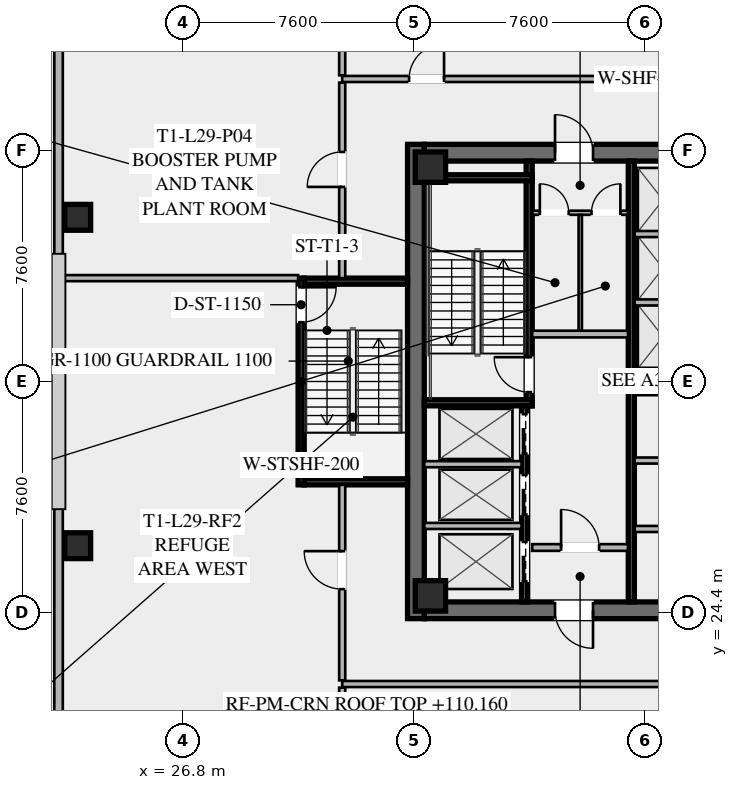
"""IFC4 building model, lengths in metres.
Left out: names, types, materials, properties, quantities, classifications, styles, units other than length and angle.
Written with IfcOpenShell. Run it as: python <this file> out.ifc"""

import sys

from ifc_helpers import new_model, si_unit, direction, frame, frame_2d, origin, origin_2d, place, context, subcontext, project, spatial, rectangle, hollow_rectangle, extrude, element, fill, save


model = new_model("IFC4")
c1 = context("Model", 3, precision=1e-05, world=origin(), true_north=direction((0.0, 1.0)))
c2 = subcontext(c1, "Body", "Model", "MODEL_VIEW")
j1 = project(units=[si_unit("LENGTHUNIT", "METRE"), si_unit("PLANEANGLEUNIT", "RADIAN")], contexts=[c1])
p1 = place(None, origin())
s1 = spatial("IfcSite", under=j1, at=p1, CompositionType="ELEMENT")
p2 = place(p1, origin())
s2 = spatial("IfcBuilding", under=s1, at=p2, CompositionType="ELEMENT")
p3 = place(p2, frame((0.0, 0.0, 109.8)))
s3 = spatial("IfcBuildingStorey", under=s2, at=p3, CompositionType="ELEMENT", Elevation=109.8)
p4 = place(p3, frame((34.475, 24.2, 0.0), z_axis=(0.0, 0.0, 1.0), x_axis=(0.0, 1.0, 0.0)))
e1 = element("IfcWall", 1, at=p4, inside=s3, PredefinedType="SHEAR", context=c2, shape_type="SweptSolid", body=[
    extrude(rectangle(XDim=15.6, YDim=0.55, at=frame_2d((7.8, 0.0))), origin(), (0.0, 0.0, 1.0), 4.6),
])
p5 = place(p3, frame((49.25, 24.475, 0.0), z_axis=(0.0, 0.0, 1.0), x_axis=(-1.0, 0.0, 0.0)))
e2 = element("IfcWall", 2, at=p5, inside=s3, PredefinedType="SHEAR", context=c2, shape_type="SweptSolid", body=[
    extrude(rectangle(XDim=14.5, YDim=0.55, at=frame_2d((7.25, 0.0))), origin(), (0.0, 0.0, 1.0), 4.6),
])
p6 = place(p5, frame((8.95, 0.0, 0.0)))
e3 = element("IfcOpeningElement", 3, at=p6, cuts=e2, PredefinedType="OPENING", context=c2, shape_type="SweptSolid", body=[
    extrude(rectangle(XDim=1.25, YDim=2.25, at=frame_2d((0.625, 1.125))), frame((0.0, 0.285, 0.0), z_axis=(0.0, -1.0, 0.0), x_axis=(1.0, 0.0, 0.0)), (0.0, 0.0, 1.0), 0.57),
])
p7 = place(p5, frame((3.9, 0.0, 0.0)))
e4 = element("IfcOpeningElement", 4, at=p7, cuts=e2, PredefinedType="OPENING", context=c2, shape_type="SweptSolid", body=[
    extrude(rectangle(XDim=1.25, YDim=2.25, at=frame_2d((0.625, 1.125))), frame((0.0, 0.285, 0.0), z_axis=(0.0, -1.0, 0.0), x_axis=(1.0, 0.0, 0.0)), (0.0, 0.0, 1.0), 0.57),
])
p8 = place(p3, frame((34.75, 39.525, 0.0), z_axis=(0.0, 0.0, 1.0), x_axis=(1.0, 0.0, 0.0)))
e5 = element("IfcWall", 5, at=p8, inside=s3, PredefinedType="SHEAR", context=c2, shape_type="SweptSolid", body=[
    extrude(rectangle(XDim=14.5, YDim=0.55, at=frame_2d((7.25, 0.0))), origin(), (0.0, 0.0, 1.0), 4.6),
])
p9 = place(p8, frame((4.3, 0.0, 0.0)))
e6 = element("IfcOpeningElement", 6, at=p9, cuts=e5, PredefinedType="OPENING", context=c2, shape_type="SweptSolid", body=[
    extrude(rectangle(XDim=1.25, YDim=2.25, at=frame_2d((0.625, 1.125))), frame((0.0, 0.285, 0.0), z_axis=(0.0, -1.0, 0.0), x_axis=(1.0, 0.0, 0.0)), (0.0, 0.0, 1.0), 0.57),
])
p10 = place(p8, frame((9.35, 0.0, 0.0)))
e7 = element("IfcOpeningElement", 7, at=p10, cuts=e5, PredefinedType="OPENING", context=c2, shape_type="SweptSolid", body=[
    extrude(rectangle(XDim=1.25, YDim=2.25, at=frame_2d((0.625, 1.125))), frame((0.0, 0.285, 0.0), z_axis=(0.0, -1.0, 0.0), x_axis=(1.0, 0.0, 0.0)), (0.0, 0.0, 1.0), 0.57),
])
for number, where, z_axis, x_axis in (
    (8, (34.95, 24.95, 0.0), (0.0, 0.0, 1.0), (1.0, 0.0, 0.0)),
    (9, (34.95, 39.05, 0.0), (0.0, 0.0, 1.0), (1.0, 0.0, 0.0)),
):
    element("IfcColumn", number, at=place(p3, frame(where, z_axis=z_axis, x_axis=x_axis)), inside=s3, PredefinedType="COLUMN", context=c2, shape_type="SweptSolid", body=[
        extrude(hollow_rectangle(XDim=1.0, YDim=1.0, WallThickness=0.04, at=origin_2d()), origin(), (0.0, 0.0, 1.0), 4.42),
    ])
for number, where, z_axis, x_axis in (
    (10, (23.35, 37.4, -0.295), (0.0, 0.0, 1.0), (1.0, 0.0, 0.0)),
    (11, (23.35, 26.6, -0.295), (0.0, 0.0, 1.0), (1.0, 0.0, 0.0)),
):
    element("IfcColumn", number, at=place(p3, frame(where, z_axis=z_axis, x_axis=x_axis)), inside=s3, PredefinedType="COLUMN", context=c2, shape_type="SweptSolid", body=[
        extrude(hollow_rectangle(XDim=0.85, YDim=0.85, WallThickness=0.035, at=origin_2d()), origin(), (0.0, 0.0, 1.0), 4.715),
    ])
p11 = place(p3, frame((22.72, 15.22, 0.0), z_axis=(0.0, 0.0, 1.0), x_axis=(0.0, 1.0, 0.0)))
e12 = element("IfcWall", 12, at=p11, inside=s3, PredefinedType="SOLIDWALL", context=c2, shape_type="SweptSolid", body=[
    extrude(rectangle(XDim=33.56, YDim=0.28, at=frame_2d((16.78, 0.0))), origin(), (0.0, 0.0, 1.0), 4.42),
])
p12 = place(p3, frame((38.2, 31.2, 0.0), z_axis=(0.0, 0.0, 1.0), x_axis=(0.0, 1.0, 0.0)))
e13 = element("IfcWall", 13, at=p12, inside=s3, PredefinedType="SHEAR", context=c2, shape_type="SweptSolid", body=[
    extrude(rectangle(XDim=8.05, YDim=0.2, at=frame_2d((4.025, 0.0))), origin(), (0.0, 0.0, 1.0), 4.42),
])
p13 = place(p12, frame((0.45, 0.0, 0.0)))
e14 = element("IfcOpeningElement", 14, at=p13, cuts=e13, PredefinedType="OPENING", context=c2, shape_type="SweptSolid", body=[
    extrude(rectangle(XDim=1.15, YDim=2.2, at=frame_2d((0.575, 1.1))), frame((0.0, 0.11, 0.0), z_axis=(0.0, -1.0, 0.0), x_axis=(1.0, 0.0, 0.0)), (0.0, 0.0, 1.0), 0.22),
])
for number, where, z_axis, x_axis in (
    (15, (34.75, 31.3, 0.0), (0.0, 0.0, 1.0), (1.0, 0.0, 0.0)),
    (16, (34.75, 38.7, 0.0), (0.0, 0.0, 1.0), (1.0, 0.0, 0.0)),
):
    element("IfcWall", number, at=place(p3, frame(where, z_axis=z_axis, x_axis=x_axis)), inside=s3, PredefinedType="SHEAR", context=c2, shape_type="SweptSolid", body=[
        extrude(rectangle(XDim=3.55, YDim=0.2, at=frame_2d((1.775, 0.0))), origin(), (0.0, 0.0, 1.0), 4.42),
    ])
p14 = place(p3, frame((41.56, 24.75, 0.0), z_axis=(0.0, 0.0, 1.0), x_axis=(0.0, 1.0, 0.0)))
e17 = element("IfcWall", 17, at=p14, inside=s3, PredefinedType="SHEAR", context=c2, shape_type="SweptSolid", body=[
    extrude(rectangle(XDim=14.5, YDim=0.2, at=frame_2d((7.25, 0.0))), origin(), (0.0, 0.0, 1.0), 4.42),
])
p15 = place(p3, frame((38.3, 33.56, 0.0), z_axis=(0.0, 0.0, 1.0), x_axis=(1.0, 0.0, 0.0)))
e18 = element("IfcWall", 18, at=p15, inside=s3, PredefinedType="SOLIDWALL", context=c2, shape_type="SweptSolid", body=[
    extrude(rectangle(XDim=3.15, YDim=0.22, at=frame_2d((1.575, 0.0))), origin(), (0.0, 0.0, 1.0), 3.531),
])
p16 = place(p3, frame((38.3, 26.54, 0.0), z_axis=(0.0, 0.0, 1.0), x_axis=(1.0, 0.0, 0.0)))
e19 = element("IfcWall", 19, at=p16, inside=s3, PredefinedType="SOLIDWALL", context=c2, shape_type="SweptSolid", body=[
    extrude(rectangle(XDim=3.15, YDim=0.22, at=frame_2d((1.575, 0.0))), origin(), (0.0, 0.0, 1.0), 3.531),
])
p17 = place(p16, frame((0.95, 0.0, 0.0)))
e20 = element("IfcOpeningElement", 20, at=p17, cuts=e19, PredefinedType="OPENING", context=c2, shape_type="SweptSolid", body=[
    extrude(rectangle(XDim=1.25, YDim=2.25, at=frame_2d((0.625, 1.125))), frame((0.0, 0.12, 0.0), z_axis=(0.0, -1.0, 0.0), x_axis=(1.0, 0.0, 0.0)), (0.0, 0.0, 1.0), 0.24),
])
p18 = place(p3, frame((38.05, 24.75, 0.0), z_axis=(0.0, 0.0, 1.0), x_axis=(0.0, 1.0, 0.0)))
e21 = element("IfcWall", 21, at=p18, inside=s3, PredefinedType="SHEAR", context=c2, shape_type="SweptSolid", body=[
    extrude(rectangle(XDim=6.45, YDim=0.2, at=frame_2d((3.225, 0.0))), origin(), (0.0, 0.0, 1.0), 4.42),
])
p19 = place(p18, frame((4.875, 0.0, 0.0)))
e22 = element("IfcOpeningElement", 22, at=p19, cuts=e21, PredefinedType="OPENING", context=c2, shape_type="SweptSolid", body=[
    extrude(rectangle(XDim=1.3, YDim=2.25, at=frame_2d((0.65, 1.125))), frame((0.0, 0.11, 0.0), z_axis=(0.0, -1.0, 0.0), x_axis=(1.0, 0.0, 0.0)), (0.0, 0.0, 1.0), 0.22),
])
p20 = place(p18, frame((2.875, 0.0, 0.0)))
e23 = element("IfcOpeningElement", 23, at=p20, cuts=e21, PredefinedType="OPENING", context=c2, shape_type="SweptSolid", body=[
    extrude(rectangle(XDim=1.3, YDim=2.25, at=frame_2d((0.65, 1.125))), frame((0.0, 0.11, 0.0), z_axis=(0.0, -1.0, 0.0), x_axis=(1.0, 0.0, 0.0)), (0.0, 0.0, 1.0), 0.22),
])
p21 = place(p18, frame((0.675, 0.0, 0.0)))
e24 = element("IfcOpeningElement", 24, at=p21, cuts=e21, PredefinedType="OPENING", context=c2, shape_type="SweptSolid", body=[
    extrude(rectangle(XDim=1.3, YDim=2.25, at=frame_2d((0.65, 1.125))), frame((0.0, 0.11, 0.0), z_axis=(0.0, -1.0, 0.0), x_axis=(1.0, 0.0, 0.0)), (0.0, 0.0, 1.0), 0.22),
])
for number, where, z_axis, x_axis in (
    (25, (34.75, 27.25, 0.0), (0.0, 0.0, 1.0), (1.0, 0.0, 0.0)),
    (26, (34.75, 29.28, 0.0), (0.0, 0.0, 1.0), (1.0, 0.0, 0.0)),
):
    element("IfcWall", number, at=place(p3, frame(where, z_axis=z_axis, x_axis=x_axis)), inside=s3, PredefinedType="SOLIDWALL", context=c2, shape_type="SweptSolid", body=[
        extrude(rectangle(XDim=3.2, YDim=0.2, at=frame_2d((1.6, 0.0))), origin(), (0.0, 0.0, 1.0), 4.42),
    ])
p22 = place(p3, frame((38.3, 37.55, 0.0), z_axis=(0.0, 0.0, 1.0), x_axis=(1.0, 0.0, 0.0)))
e27 = element("IfcWall", 27, at=p22, inside=s3, PredefinedType="PARTITIONING", context=c2, shape_type="SweptSolid", body=[
    extrude(rectangle(XDim=3.15, YDim=0.135, at=frame_2d((1.575, 0.0))), origin(), (0.0, 0.0, 1.0), 3.531),
])
p23 = place(p22, frame((0.25, 0.0, 0.0)))
e28 = element("IfcOpeningElement", 28, at=p23, cuts=e27, PredefinedType="OPENING", context=c2, shape_type="SweptSolid", body=[
    extrude(rectangle(XDim=0.95, YDim=2.05, at=frame_2d((0.475, 1.025))), frame((0.0, 0.077, 0.0), z_axis=(0.0, -1.0, 0.0), x_axis=(1.0, 0.0, 0.0)), (0.0, 0.0, 1.0), 0.155),
])
p24 = place(p22, frame((1.95, 0.0, 0.0)))
e29 = element("IfcOpeningElement", 29, at=p24, cuts=e27, PredefinedType="OPENING", context=c2, shape_type="SweptSolid", body=[
    extrude(rectangle(XDim=0.95, YDim=2.05, at=frame_2d((0.475, 1.025))), frame((0.0, 0.077, 0.0), z_axis=(0.0, -1.0, 0.0), x_axis=(1.0, 0.0, 0.0)), (0.0, 0.0, 1.0), 0.155),
])
p25 = place(p3, frame((39.88, 33.68, 0.0), z_axis=(0.0, 0.0, 1.0), x_axis=(0.0, 1.0, 0.0)))
e30 = element("IfcWall", 30, at=p25, inside=s3, PredefinedType="PARTITIONING", context=c2, shape_type="SweptSolid", body=[
    extrude(rectangle(XDim=3.8, YDim=0.11, at=frame_2d((1.9, 0.0))), origin(), (0.0, 0.0, 1.0), 3.531),
])
for number, where, z_axis, x_axis in (
    (31, (41.67, 27.15, 0.0), (0.0, 0.0, 1.0), (1.0, 0.0, 0.0)),
    (32, (41.67, 29.4, 0.0), (0.0, 0.0, 1.0), (1.0, 0.0, 0.0)),
    (33, (41.67, 31.65, 0.0), (0.0, 0.0, 1.0), (1.0, 0.0, 0.0)),
    (34, (41.67, 32.35, 0.0), (0.0, 0.0, 1.0), (1.0, 0.0, 0.0)),
    (35, (41.67, 34.6, 0.0), (0.0, 0.0, 1.0), (1.0, 0.0, 0.0)),
    (36, (41.67, 36.85, 0.0), (0.0, 0.0, 1.0), (1.0, 0.0, 0.0)),
):
    element("IfcWall", number, at=place(p3, frame(where, z_axis=z_axis, x_axis=x_axis)), inside=s3, PredefinedType="SOLIDWALL", context=c2, shape_type="SweptSolid", body=[
        extrude(rectangle(XDim=1.88, YDim=0.2, at=frame_2d((0.94, 0.0))), origin(), (0.0, 0.0, 1.0), 4.42),
    ])
p26 = place(p3, frame((30.7, 35.4, 0.0), z_axis=(0.0, 0.0, 1.0), x_axis=(0.0, -1.0, 0.0)))
e37 = element("IfcWall", 37, at=p26, inside=s3, PredefinedType="SHEAR", context=c2, shape_type="SweptSolid", body=[
    extrude(rectangle(XDim=6.8, YDim=0.2, at=frame_2d((3.4, 0.0))), origin(), (0.0, 0.0, 1.0), 4.42),
])
p27 = place(p26, frame((0.3, 0.0, 0.0)))
e38 = element("IfcOpeningElement", 38, at=p27, cuts=e37, PredefinedType="OPENING", context=c2, shape_type="SweptSolid", body=[
    extrude(rectangle(XDim=1.15, YDim=2.2, at=frame_2d((0.575, 1.1))), frame((0.0, 0.11, 0.0), z_axis=(0.0, -1.0, 0.0), x_axis=(1.0, 0.0, 0.0)), (0.0, 0.0, 1.0), 0.22),
])
for number, where, z_axis, x_axis in (
    (39, (34.2, 35.3, 0.0), (0.0, 0.0, 1.0), (-1.0, 0.0, 0.0)),
    (40, (30.8, 28.7, 0.0), (0.0, 0.0, 1.0), (1.0, 0.0, 0.0)),
):
    element("IfcWall", number, at=place(p3, frame(where, z_axis=z_axis, x_axis=x_axis)), inside=s3, PredefinedType="SHEAR", context=c2, shape_type="SweptSolid", body=[
        extrude(rectangle(XDim=3.4, YDim=0.2, at=frame_2d((1.7, 0.0))), origin(), (0.0, 0.0, 1.0), 4.42),
    ])
p28 = place(p3, frame((32.05, 41.95, 0.0), z_axis=(0.0, 0.0, 1.0), x_axis=(1.0, 0.0, 0.0)))
e41 = element("IfcWall", 41, at=p28, inside=s3, PredefinedType="SOLIDWALL", context=c2, shape_type="SweptSolid", body=[
    extrude(rectangle(XDim=19.9, YDim=0.2, at=frame_2d((9.95, 0.0))), origin(), (0.0, 0.0, 1.0), 3.531),
])
p29 = place(p28, frame((2.2, 0.0, 0.0)))
e42 = element("IfcOpeningElement", 42, at=p29, cuts=e41, PredefinedType="OPENING", context=c2, shape_type="SweptSolid", body=[
    extrude(rectangle(XDim=1.15, YDim=2.2, at=frame_2d((0.575, 1.1))), frame((0.0, 0.11, 0.0), z_axis=(0.0, -1.0, 0.0), x_axis=(1.0, 0.0, 0.0)), (0.0, 0.0, 1.0), 0.22),
])
p30 = place(p3, frame((51.95, 22.05, 0.0), z_axis=(0.0, 0.0, 1.0), x_axis=(-1.0, 0.0, 0.0)))
e43 = element("IfcWall", 43, at=p30, inside=s3, PredefinedType="SOLIDWALL", context=c2, shape_type="SweptSolid", body=[
    extrude(rectangle(XDim=19.9, YDim=0.2, at=frame_2d((9.95, 0.0))), origin(), (0.0, 0.0, 1.0), 3.531),
])
p31 = place(p30, frame((2.2, 0.0, 0.0)))
e44 = element("IfcOpeningElement", 44, at=p31, cuts=e43, PredefinedType="OPENING", context=c2, shape_type="SweptSolid", body=[
    extrude(rectangle(XDim=1.15, YDim=2.2, at=frame_2d((0.575, 1.1))), frame((0.0, 0.11, 0.0), z_axis=(0.0, -1.0, 0.0), x_axis=(1.0, 0.0, 0.0)), (0.0, 0.0, 1.0), 0.22),
])
p32 = place(p3, frame((32.05, 22.17, 0.0), z_axis=(0.0, 0.0, 1.0), x_axis=(0.0, 1.0, 0.0)))
e45 = element("IfcWall", 45, at=p32, inside=s3, PredefinedType="SOLIDWALL", context=c2, shape_type="SweptSolid", body=[
    extrude(rectangle(XDim=6.43, YDim=0.2, at=frame_2d((3.215, 0.0))), origin(), (0.0, 0.0, 1.0), 3.531),
])
p33 = place(p32, frame((3.0, 0.0, 0.0)))
e46 = element("IfcOpeningElement", 46, at=p33, cuts=e45, PredefinedType="OPENING", context=c2, shape_type="SweptSolid", body=[
    extrude(rectangle(XDim=1.25, YDim=2.25, at=frame_2d((0.625, 1.125))), frame((0.0, 0.11, 0.0), z_axis=(0.0, -1.0, 0.0), x_axis=(1.0, 0.0, 0.0)), (0.0, 0.0, 1.0), 0.22),
])
p34 = place(p3, frame((32.05, 35.4, 0.0), z_axis=(0.0, 0.0, 1.0), x_axis=(0.0, 1.0, 0.0)))
e47 = element("IfcWall", 47, at=p34, inside=s3, PredefinedType="SOLIDWALL", context=c2, shape_type="SweptSolid", body=[
    extrude(rectangle(XDim=6.43, YDim=0.2, at=frame_2d((3.215, 0.0))), origin(), (0.0, 0.0, 1.0), 3.531),
])
p35 = place(p34, frame((3.0, 0.0, 0.0)))
e48 = element("IfcOpeningElement", 48, at=p35, cuts=e47, PredefinedType="OPENING", context=c2, shape_type="SweptSolid", body=[
    extrude(rectangle(XDim=1.15, YDim=2.2, at=frame_2d((0.575, 1.1))), frame((0.0, 0.11, 0.0), z_axis=(0.0, -1.0, 0.0), x_axis=(1.0, 0.0, 0.0)), (0.0, 0.0, 1.0), 0.22),
])
for number, where, z_axis, x_axis in (
    (49, (32.05, 42.07, 0.0), (0.0, 0.0, 1.0), (0.0, 1.0, 0.0)),
    (50, (32.05, 21.93, 0.0), (0.0, 0.0, 1.0), (0.0, -1.0, 0.0)),
):
    element("IfcWall", number, at=place(p3, frame(where, z_axis=z_axis, x_axis=x_axis)), inside=s3, PredefinedType="SOLIDWALL", context=c2, shape_type="SweptSolid", body=[
        extrude(rectangle(XDim=9.21, YDim=0.2, at=frame_2d((4.605, 0.0))), origin(), (0.0, 0.0, 1.0), 3.531),
    ])
p36 = place(p3, frame((22.72, 35.4, 0.0), z_axis=(0.0, 0.0, 1.0), x_axis=(1.0, 0.0, 0.0)))
e51 = element("IfcWall", 51, at=p36, inside=s3, PredefinedType="SOLIDWALL", context=c2, shape_type="SweptSolid", body=[
    extrude(rectangle(XDim=7.88, YDim=0.2, at=frame_2d((3.94, 0.0))), origin(), (0.0, 0.0, 1.0), 3.531),
])
p37 = place(p9, origin())
e52 = element("IfcDoor", 52, at=p37, inside=s3, OperationType="SINGLE_SWING_LEFT", PredefinedType="DOOR", context=c2, shape_type="SweptSolid", body=[
    extrude(rectangle(XDim=1.25, YDim=2.25, at=frame_2d((0.625, 1.125))), frame((0.0, 0.025, 0.0), z_axis=(0.0, -1.0, 0.0), x_axis=(1.0, 0.0, 0.0)), (0.0, 0.0, 1.0), 0.05),
])
fill(e6, e52)
p38 = place(p6, origin())
e53 = element("IfcDoor", 53, at=p38, inside=s3, OperationType="SINGLE_SWING_LEFT", PredefinedType="DOOR", context=c2, shape_type="SweptSolid", body=[
    extrude(rectangle(XDim=1.25, YDim=2.25, at=frame_2d((0.625, 1.125))), frame((0.0, 0.025, 0.0), z_axis=(0.0, -1.0, 0.0), x_axis=(1.0, 0.0, 0.0)), (0.0, 0.0, 1.0), 0.05),
])
fill(e3, e53)
p39 = place(p13, origin())
e54 = element("IfcDoor", 54, at=p39, inside=s3, OperationType="SINGLE_SWING_RIGHT", PredefinedType="DOOR", context=c2, shape_type="SweptSolid", body=[
    extrude(rectangle(XDim=1.15, YDim=2.2, at=frame_2d((0.575, 1.1))), frame((0.0, 0.025, 0.0), z_axis=(0.0, -1.0, 0.0), x_axis=(1.0, 0.0, 0.0)), (0.0, 0.0, 1.0), 0.05),
])
fill(e14, e54)
p40 = place(p17, origin())
e55 = element("IfcDoor", 55, at=p40, inside=s3, OperationType="SINGLE_SWING_LEFT", PredefinedType="DOOR", context=c2, shape_type="SweptSolid", body=[
    extrude(rectangle(XDim=1.25, YDim=2.25, at=frame_2d((0.625, 1.125))), frame((0.0, 0.025, 0.0), z_axis=(0.0, -1.0, 0.0), x_axis=(1.0, 0.0, 0.0)), (0.0, 0.0, 1.0), 0.05),
])
fill(e20, e55)
p41 = place(p23, origin())
e56 = element("IfcDoor", 56, at=p41, inside=s3, OperationType="SINGLE_SWING_LEFT", PredefinedType="DOOR", context=c2, shape_type="SweptSolid", body=[
    extrude(rectangle(XDim=0.95, YDim=2.05, at=frame_2d((0.475, 1.025))), frame((0.0, 0.025, 0.0), z_axis=(0.0, -1.0, 0.0), x_axis=(1.0, 0.0, 0.0)), (0.0, 0.0, 1.0), 0.05),
])
fill(e28, e56)
p42 = place(p24, origin())
e57 = element("IfcDoor", 57, at=p42, inside=s3, OperationType="SINGLE_SWING_RIGHT", PredefinedType="DOOR", context=c2, shape_type="SweptSolid", body=[
    extrude(rectangle(XDim=0.95, YDim=2.05, at=frame_2d((0.475, 1.025))), frame((0.0, 0.025, 0.0), z_axis=(0.0, -1.0, 0.0), x_axis=(1.0, 0.0, 0.0)), (0.0, 0.0, 1.0), 0.05),
])
fill(e29, e57)
p43 = place(p27, origin())
e58 = element("IfcDoor", 58, at=p43, inside=s3, OperationType="SINGLE_SWING_LEFT", PredefinedType="DOOR", context=c2, shape_type="SweptSolid", body=[
    extrude(rectangle(XDim=1.15, YDim=2.2, at=frame_2d((0.575, 1.1))), frame((0.0, 0.025, 0.0), z_axis=(0.0, -1.0, 0.0), x_axis=(1.0, 0.0, 0.0)), (0.0, 0.0, 1.0), 0.05),
])
fill(e38, e58)
p44 = place(p29, origin())
e59 = element("IfcDoor", 59, at=p44, inside=s3, OperationType="SINGLE_SWING_RIGHT", PredefinedType="DOOR", context=c2, shape_type="SweptSolid", body=[
    extrude(rectangle(XDim=1.15, YDim=2.2, at=frame_2d((0.575, 1.1))), frame((0.0, 0.025, 0.0), z_axis=(0.0, -1.0, 0.0), x_axis=(1.0, 0.0, 0.0)), (0.0, 0.0, 1.0), 0.05),
])
fill(e42, e59)
p45 = place(p33, origin())
e60 = element("IfcDoor", 60, at=p45, inside=s3, OperationType="SINGLE_SWING_RIGHT", PredefinedType="DOOR", context=c2, shape_type="SweptSolid", body=[
    extrude(rectangle(XDim=1.25, YDim=2.25, at=frame_2d((0.625, 1.125))), frame((0.0, 0.025, 0.0), z_axis=(0.0, -1.0, 0.0), x_axis=(1.0, 0.0, 0.0)), (0.0, 0.0, 1.0), 0.05),
])
fill(e46, e60)
p46 = place(p35, origin())
e61 = element("IfcDoor", 61, at=p46, inside=s3, OperationType="SINGLE_SWING_LEFT", PredefinedType="DOOR", context=c2, shape_type="SweptSolid", body=[
    extrude(rectangle(XDim=1.15, YDim=2.2, at=frame_2d((0.575, 1.1))), frame((0.0, 0.025, 0.0), z_axis=(0.0, -1.0, 0.0), x_axis=(1.0, 0.0, 0.0)), (0.0, 0.0, 1.0), 0.05),
])
fill(e48, e61)
p47 = place(p19, origin())
e62 = element("IfcDoor", 62, at=p47, inside=s3, OperationType="SLIDING_TO_LEFT", PredefinedType="DOOR", context=c2, shape_type="SweptSolid", body=[
    extrude(rectangle(XDim=1.3, YDim=2.25, at=frame_2d((0.65, 1.125))), frame((0.0, 0.025, 0.0), z_axis=(0.0, -1.0, 0.0), x_axis=(1.0, 0.0, 0.0)), (0.0, 0.0, 1.0), 0.05),
])
fill(e22, e62)
p48 = place(p20, origin())
e63 = element("IfcDoor", 63, at=p48, inside=s3, OperationType="SLIDING_TO_LEFT", PredefinedType="DOOR", context=c2, shape_type="SweptSolid", body=[
    extrude(rectangle(XDim=1.3, YDim=2.25, at=frame_2d((0.65, 1.125))), frame((0.0, 0.025, 0.0), z_axis=(0.0, -1.0, 0.0), x_axis=(1.0, 0.0, 0.0)), (0.0, 0.0, 1.0), 0.05),
])
fill(e23, e63)
p49 = place(p21, origin())
e64 = element("IfcDoor", 64, at=p49, inside=s3, OperationType="SLIDING_TO_LEFT", PredefinedType="DOOR", context=c2, shape_type="SweptSolid", body=[
    extrude(rectangle(XDim=1.3, YDim=2.25, at=frame_2d((0.65, 1.125))), frame((0.0, 0.025, 0.0), z_axis=(0.0, -1.0, 0.0), x_axis=(1.0, 0.0, 0.0)), (0.0, 0.0, 1.0), 0.05),
])
fill(e24, e64)
save(model, sys.argv[1])
